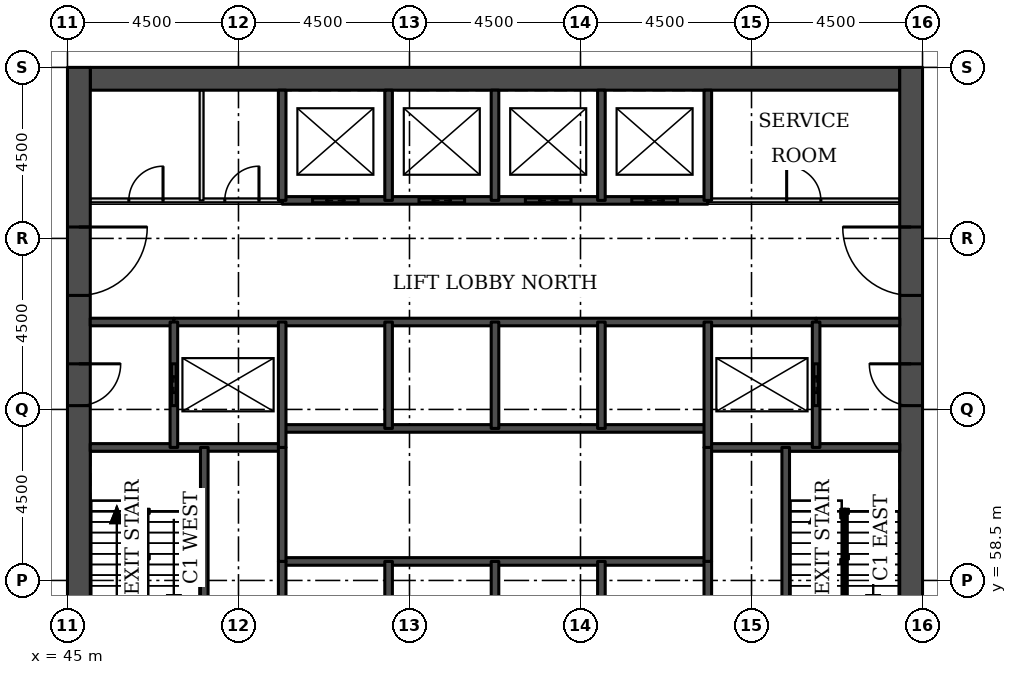
"""IFC4 building model, lengths in metres.
Left out: names, types, materials, properties, quantities, classifications, styles, units other than length and angle.
Written with IfcOpenShell. Run it as: python <this file> out.ifc"""

import sys

from ifc_helpers import new_model, si_unit, direction, frame, frame_2d, origin, place, context, subcontext, project, spatial, rectangle, extrude, element, fill, save


model = new_model("IFC4")
c1 = context("Model", 3, precision=1e-05, world=origin(), true_north=direction((0.0, 1.0)))
c2 = subcontext(c1, "Body", "Model", "MODEL_VIEW")
j1 = project(units=[si_unit("LENGTHUNIT", "METRE"), si_unit("PLANEANGLEUNIT", "RADIAN")], contexts=[c1])
p1 = place(None, origin())
s1 = spatial("IfcSite", under=j1, at=p1, CompositionType="ELEMENT")
p2 = place(p1, origin())
s2 = spatial("IfcBuilding", under=s1, at=p2, CompositionType="ELEMENT")
p3 = place(p2, frame((0.0, 0.0, 13.5)))
s3 = spatial("IfcBuildingStorey", under=s2, at=p3, CompositionType="ELEMENT", Elevation=13.5)
p4 = place(p3, frame((45.6, 71.7, 0.0), z_axis=(0.0, 0.0, 1.0), x_axis=(1.0, 0.0, 0.0)))
e1 = element("IfcWall", 1, at=p4, inside=s3, PredefinedType="SHEAR", context=c2, shape_type="SweptSolid", body=[
    extrude(rectangle(XDim=21.3, YDim=0.6, at=frame_2d((10.65, 0.0))), origin(), (0.0, 0.0, 1.0), 5.0),
])
p5 = place(p3, frame((45.3, 49.5, 0.0), z_axis=(0.0, 0.0, 1.0), x_axis=(0.0, 1.0, 0.0)))
e2 = element("IfcWall", 2, at=p5, inside=s3, PredefinedType="SHEAR", context=c2, shape_type="SweptSolid", body=[
    extrude(rectangle(XDim=22.5, YDim=0.6, at=frame_2d((11.25, 0.0))), origin(), (0.0, 0.0, 1.0), 5.0),
])
p6 = place(p5, frame((4.2, 0.0, 0.0)))
e3 = element("IfcOpeningElement", 3, at=p6, cuts=e2, PredefinedType="OPENING", context=c2, shape_type="SweptSolid", body=[
    extrude(rectangle(XDim=1.8, YDim=2.1, at=frame_2d((0.9, 1.05))), frame((0.0, 0.31, 0.0), z_axis=(0.0, -1.0, 0.0), x_axis=(1.0, 0.0, 0.0)), (0.0, 0.0, 1.0), 0.62),
])
p7 = place(p5, frame((6.9, 0.0, 0.0)))
e4 = element("IfcOpeningElement", 4, at=p7, cuts=e2, PredefinedType="OPENING", context=c2, shape_type="SweptSolid", body=[
    extrude(rectangle(XDim=1.1, YDim=2.1, at=frame_2d((0.55, 1.05))), frame((0.0, 0.31, 0.0), z_axis=(0.0, -1.0, 0.0), x_axis=(1.0, 0.0, 0.0)), (0.0, 0.0, 1.0), 0.62),
])
p8 = place(p5, frame((13.6, 0.0, 0.0)))
e5 = element("IfcOpeningElement", 5, at=p8, cuts=e2, PredefinedType="OPENING", context=c2, shape_type="SweptSolid", body=[
    extrude(rectangle(XDim=1.1, YDim=2.1, at=frame_2d((0.55, 1.05))), frame((0.0, 0.31, 0.0), z_axis=(0.0, -1.0, 0.0), x_axis=(1.0, 0.0, 0.0)), (0.0, 0.0, 1.0), 0.62),
])
p9 = place(p5, frame((16.5, 0.0, 0.0)))
e6 = element("IfcOpeningElement", 6, at=p9, cuts=e2, PredefinedType="OPENING", context=c2, shape_type="SweptSolid", body=[
    extrude(rectangle(XDim=1.8, YDim=2.1, at=frame_2d((0.9, 1.05))), frame((0.0, 0.31, 0.0), z_axis=(0.0, -1.0, 0.0), x_axis=(1.0, 0.0, 0.0)), (0.0, 0.0, 1.0), 0.62),
])
p10 = place(p3, frame((67.2, 49.5, 0.0), z_axis=(0.0, 0.0, 1.0), x_axis=(0.0, 1.0, 0.0)))
e7 = element("IfcWall", 7, at=p10, inside=s3, PredefinedType="SHEAR", context=c2, shape_type="SweptSolid", body=[
    extrude(rectangle(XDim=22.5, YDim=0.6, at=frame_2d((11.25, 0.0))), origin(), (0.0, 0.0, 1.0), 5.0),
])
p11 = place(p10, frame((4.2, 0.0, 0.0)))
e8 = element("IfcOpeningElement", 8, at=p11, cuts=e7, PredefinedType="OPENING", context=c2, shape_type="SweptSolid", body=[
    extrude(rectangle(XDim=1.8, YDim=2.1, at=frame_2d((0.9, 1.05))), frame((0.0, 0.31, 0.0), z_axis=(0.0, -1.0, 0.0), x_axis=(1.0, 0.0, 0.0)), (0.0, 0.0, 1.0), 0.62),
])
p12 = place(p10, frame((6.9, 0.0, 0.0)))
e9 = element("IfcOpeningElement", 9, at=p12, cuts=e7, PredefinedType="OPENING", context=c2, shape_type="SweptSolid", body=[
    extrude(rectangle(XDim=1.1, YDim=2.1, at=frame_2d((0.55, 1.05))), frame((0.0, 0.31, 0.0), z_axis=(0.0, -1.0, 0.0), x_axis=(1.0, 0.0, 0.0)), (0.0, 0.0, 1.0), 0.62),
])
p13 = place(p10, frame((13.6, 0.0, 0.0)))
e10 = element("IfcOpeningElement", 10, at=p13, cuts=e7, PredefinedType="OPENING", context=c2, shape_type="SweptSolid", body=[
    extrude(rectangle(XDim=1.1, YDim=2.1, at=frame_2d((0.55, 1.05))), frame((0.0, 0.31, 0.0), z_axis=(0.0, -1.0, 0.0), x_axis=(1.0, 0.0, 0.0)), (0.0, 0.0, 1.0), 0.62),
])
p14 = place(p10, frame((16.5, 0.0, 0.0)))
e11 = element("IfcOpeningElement", 11, at=p14, cuts=e7, PredefinedType="OPENING", context=c2, shape_type="SweptSolid", body=[
    extrude(rectangle(XDim=1.8, YDim=2.1, at=frame_2d((0.9, 1.05))), frame((0.0, 0.31, 0.0), z_axis=(0.0, -1.0, 0.0), x_axis=(1.0, 0.0, 0.0)), (0.0, 0.0, 1.0), 0.62),
])
p15 = place(p3, frame((50.65, 59.0, 0.0), z_axis=(0.0, 0.0, 1.0), x_axis=(1.0, 0.0, 0.0)))
e12 = element("IfcWall", 12, at=p15, inside=s3, PredefinedType="SOLIDWALL", context=c2, shape_type="SweptSolid", body=[
    extrude(rectangle(XDim=11.2, YDim=0.2, at=frame_2d((5.6, 0.0))), origin(), (0.0, 0.0, 1.0), 5.0),
])
for number, where, z_axis, x_axis in (
    (13, (45.6, 62.0, 0.0), (0.0, 0.0, 1.0), (1.0, 0.0, 0.0)),
    (14, (61.85, 62.0, 0.0), (0.0, 0.0, 1.0), (1.0, 0.0, 0.0)),
):
    element("IfcWall", number, at=place(p3, frame(where, z_axis=z_axis, x_axis=x_axis)), inside=s3, PredefinedType="SOLIDWALL", context=c2, shape_type="SweptSolid", body=[
        extrude(rectangle(XDim=5.05, YDim=0.2, at=frame_2d((2.525, 0.0))), origin(), (0.0, 0.0, 1.0), 4.78),
    ])
p16 = place(p3, frame((50.65, 62.5, 0.0), z_axis=(0.0, 0.0, 1.0), x_axis=(1.0, 0.0, 0.0)))
e15 = element("IfcWall", 15, at=p16, inside=s3, PredefinedType="SOLIDWALL", context=c2, shape_type="SweptSolid", body=[
    extrude(rectangle(XDim=11.2, YDim=0.2, at=frame_2d((5.6, 0.0))), origin(), (0.0, 0.0, 1.0), 5.0),
])
for number, where, z_axis, x_axis in (
    (16, (45.6, 65.3, 0.0), (0.0, 0.0, 1.0), (1.0, 0.0, 0.0)),
    (17, (64.7, 65.3, 0.0), (0.0, 0.0, 1.0), (1.0, 0.0, 0.0)),
):
    element("IfcWall", number, at=place(p3, frame(where, z_axis=z_axis, x_axis=x_axis)), inside=s3, PredefinedType="SOLIDWALL", context=c2, shape_type="SweptSolid", body=[
        extrude(rectangle(XDim=2.2, YDim=0.2, at=frame_2d((1.1, 0.0))), origin(), (0.0, 0.0, 1.0), 4.78),
    ])
p17 = place(p3, frame((47.8, 65.3, 0.0), z_axis=(0.0, 0.0, 1.0), x_axis=(1.0, 0.0, 0.0)))
e18 = element("IfcWall", 18, at=p17, inside=s3, PredefinedType="SOLIDWALL", context=c2, shape_type="SweptSolid", body=[
    extrude(rectangle(XDim=16.9, YDim=0.2, at=frame_2d((8.45, 0.0))), origin(), (0.0, 0.0, 1.0), 4.78),
])
p18 = place(p3, frame((45.6, 68.5, 0.0), z_axis=(0.0, 0.0, 1.0), x_axis=(1.0, 0.0, 0.0)))
e19 = element("IfcWall", 19, at=p18, inside=s3, PredefinedType="PARTITIONING", context=c2, shape_type="SweptSolid", body=[
    extrude(rectangle(XDim=5.05, YDim=0.1, at=frame_2d((2.525, 0.0))), origin(), (0.0, 0.0, 1.0), 4.78),
])
p19 = place(p18, frame((1.014, 0.0, 0.0)))
e20 = element("IfcOpeningElement", 20, at=p19, cuts=e19, PredefinedType="OPENING", context=c2, shape_type="SweptSolid", body=[
    extrude(rectangle(XDim=0.9, YDim=2.1, at=frame_2d((0.45, 1.05))), frame((0.0, 0.06, 0.0), z_axis=(0.0, -1.0, 0.0), x_axis=(1.0, 0.0, 0.0)), (0.0, 0.0, 1.0), 0.12),
])
p20 = place(p18, frame((3.54, 0.0, 0.0)))
e21 = element("IfcOpeningElement", 21, at=p20, cuts=e19, PredefinedType="OPENING", context=c2, shape_type="SweptSolid", body=[
    extrude(rectangle(XDim=0.9, YDim=2.1, at=frame_2d((0.45, 1.05))), frame((0.0, 0.06, 0.0), z_axis=(0.0, -1.0, 0.0), x_axis=(1.0, 0.0, 0.0)), (0.0, 0.0, 1.0), 0.12),
])
p21 = place(p3, frame((61.85, 68.5, 0.0), z_axis=(0.0, 0.0, 1.0), x_axis=(1.0, 0.0, 0.0)))
e22 = element("IfcWall", 22, at=p21, inside=s3, PredefinedType="PARTITIONING", context=c2, shape_type="SweptSolid", body=[
    extrude(rectangle(XDim=5.05, YDim=0.1, at=frame_2d((2.525, 0.0))), origin(), (0.0, 0.0, 1.0), 4.78),
])
p22 = place(p21, frame((2.075, 0.0, 0.0)))
e23 = element("IfcOpeningElement", 23, at=p22, cuts=e22, PredefinedType="OPENING", context=c2, shape_type="SweptSolid", body=[
    extrude(rectangle(XDim=0.9, YDim=2.1, at=frame_2d((0.45, 1.05))), frame((0.0, 0.06, 0.0), z_axis=(0.0, -1.0, 0.0), x_axis=(1.0, 0.0, 0.0)), (0.0, 0.0, 1.0), 0.12),
])
p23 = place(p3, frame((50.65, 68.5, 0.0), z_axis=(0.0, 0.0, 1.0), x_axis=(1.0, 0.0, 0.0)))
e24 = element("IfcWall", 24, at=p23, inside=s3, PredefinedType="SOLIDWALL", context=c2, shape_type="SweptSolid", body=[
    extrude(rectangle(XDim=11.2, YDim=0.2, at=frame_2d((5.6, 0.0))), origin(), (0.0, 0.0, 1.0), 4.78),
])
p24 = place(p23, frame((0.8, 0.0, 0.0)))
e25 = element("IfcOpeningElement", 25, at=p24, cuts=e24, PredefinedType="OPENING", context=c2, shape_type="SweptSolid", body=[
    extrude(rectangle(XDim=1.2, YDim=2.1, at=frame_2d((0.6, 1.05))), frame((0.0, 0.11, 0.0), z_axis=(0.0, -1.0, 0.0), x_axis=(1.0, 0.0, 0.0)), (0.0, 0.0, 1.0), 0.22),
])
p25 = place(p23, frame((3.6, 0.0, 0.0)))
e26 = element("IfcOpeningElement", 26, at=p25, cuts=e24, PredefinedType="OPENING", context=c2, shape_type="SweptSolid", body=[
    extrude(rectangle(XDim=1.2, YDim=2.1, at=frame_2d((0.6, 1.05))), frame((0.0, 0.11, 0.0), z_axis=(0.0, -1.0, 0.0), x_axis=(1.0, 0.0, 0.0)), (0.0, 0.0, 1.0), 0.22),
])
p26 = place(p23, frame((6.4, 0.0, 0.0)))
e27 = element("IfcOpeningElement", 27, at=p26, cuts=e24, PredefinedType="OPENING", context=c2, shape_type="SweptSolid", body=[
    extrude(rectangle(XDim=1.2, YDim=2.1, at=frame_2d((0.6, 1.05))), frame((0.0, 0.11, 0.0), z_axis=(0.0, -1.0, 0.0), x_axis=(1.0, 0.0, 0.0)), (0.0, 0.0, 1.0), 0.22),
])
p27 = place(p23, frame((9.2, 0.0, 0.0)))
e28 = element("IfcOpeningElement", 28, at=p27, cuts=e24, PredefinedType="OPENING", context=c2, shape_type="SweptSolid", body=[
    extrude(rectangle(XDim=1.2, YDim=2.1, at=frame_2d((0.6, 1.05))), frame((0.0, 0.11, 0.0), z_axis=(0.0, -1.0, 0.0), x_axis=(1.0, 0.0, 0.0)), (0.0, 0.0, 1.0), 0.22),
])
p28 = place(p3, frame((47.8, 62.0, 0.0), z_axis=(0.0, 0.0, 1.0), x_axis=(0.0, 1.0, 0.0)))
e29 = element("IfcWall", 29, at=p28, inside=s3, PredefinedType="SOLIDWALL", context=c2, shape_type="SweptSolid", body=[
    extrude(rectangle(XDim=3.3, YDim=0.2, at=frame_2d((1.65, 0.0))), origin(), (0.0, 0.0, 1.0), 4.78),
])
p29 = place(p28, frame((1.1, 0.0, 0.0)))
e30 = element("IfcOpeningElement", 30, at=p29, cuts=e29, PredefinedType="OPENING", context=c2, shape_type="SweptSolid", body=[
    extrude(rectangle(XDim=1.1, YDim=2.1, at=frame_2d((0.55, 1.05))), frame((0.0, 0.11, 0.0), z_axis=(0.0, -1.0, 0.0), x_axis=(1.0, 0.0, 0.0)), (0.0, 0.0, 1.0), 0.22),
])
p30 = place(p3, frame((48.529, 68.5, 0.0), z_axis=(0.0, 0.0, 1.0), x_axis=(0.0, 1.0, 0.0)))
e31 = element("IfcWall", 31, at=p30, inside=s3, PredefinedType="PARTITIONING", context=c2, shape_type="SweptSolid", body=[
    extrude(rectangle(XDim=2.9, YDim=0.1, at=frame_2d((1.45, 0.0))), origin(), (0.0, 0.0, 1.0), 4.78),
])
p31 = place(p3, frame((48.6, 56.2, 0.0), z_axis=(0.0, 0.0, 1.0), x_axis=(0.0, 1.0, 0.0)))
e32 = element("IfcWall", 32, at=p31, inside=s3, PredefinedType="SOLIDWALL", context=c2, shape_type="SweptSolid", body=[
    extrude(rectangle(XDim=5.8, YDim=0.2, at=frame_2d((2.9, 0.0))), origin(), (0.0, 0.0, 1.0), 4.78),
])
p32 = place(p3, frame((50.65, 59.0, 0.0), z_axis=(0.0, 0.0, 1.0), x_axis=(0.0, 1.0, 0.0)))
e33 = element("IfcWall", 33, at=p32, inside=s3, PredefinedType="SOLIDWALL", context=c2, shape_type="SweptSolid", body=[
    extrude(rectangle(XDim=3.0, YDim=0.2, at=frame_2d((1.5, 0.0))), origin(), (0.0, 0.0, 1.0), 5.0),
])
p33 = place(p3, frame((50.65, 56.2, 0.0), z_axis=(0.0, 0.0, 1.0), x_axis=(0.0, 1.0, 0.0)))
e34 = element("IfcWall", 34, at=p33, inside=s3, PredefinedType="SOLIDWALL", context=c2, shape_type="SweptSolid", body=[
    extrude(rectangle(XDim=2.8, YDim=0.2, at=frame_2d((1.4, 0.0))), origin(), (0.0, 0.0, 1.0), 4.78),
])
p34 = place(p3, frame((50.65, 62.0, 0.0), z_axis=(0.0, 0.0, 1.0), x_axis=(0.0, 1.0, 0.0)))
e35 = element("IfcWall", 35, at=p34, inside=s3, PredefinedType="SOLIDWALL", context=c2, shape_type="SweptSolid", body=[
    extrude(rectangle(XDim=3.3, YDim=0.2, at=frame_2d((1.65, 0.0))), origin(), (0.0, 0.0, 1.0), 4.78),
])
p35 = place(p3, frame((50.65, 68.5, 0.0), z_axis=(0.0, 0.0, 1.0), x_axis=(0.0, 1.0, 0.0)))
e36 = element("IfcWall", 36, at=p35, inside=s3, PredefinedType="SOLIDWALL", context=c2, shape_type="SweptSolid", body=[
    extrude(rectangle(XDim=2.9, YDim=0.2, at=frame_2d((1.45, 0.0))), origin(), (0.0, 0.0, 1.0), 4.78),
])
for number, where, z_axis, x_axis in (
    (37, (53.45, 56.2, 0.0), (0.0, 0.0, 1.0), (0.0, 1.0, 0.0)),
    (38, (53.45, 62.5, 0.0), (0.0, 0.0, 1.0), (0.0, 1.0, 0.0)),
):
    element("IfcWall", number, at=place(p3, frame(where, z_axis=z_axis, x_axis=x_axis)), inside=s3, PredefinedType="SOLIDWALL", context=c2, shape_type="SweptSolid", body=[
        extrude(rectangle(XDim=2.8, YDim=0.2, at=frame_2d((1.4, 0.0))), origin(), (0.0, 0.0, 1.0), 4.78),
    ])
p36 = place(p3, frame((53.45, 68.5, 0.0), z_axis=(0.0, 0.0, 1.0), x_axis=(0.0, 1.0, 0.0)))
e39 = element("IfcWall", 39, at=p36, inside=s3, PredefinedType="SOLIDWALL", context=c2, shape_type="SweptSolid", body=[
    extrude(rectangle(XDim=2.9, YDim=0.2, at=frame_2d((1.45, 0.0))), origin(), (0.0, 0.0, 1.0), 4.78),
])
for number, where, z_axis, x_axis in (
    (40, (56.25, 56.2, 0.0), (0.0, 0.0, 1.0), (0.0, 1.0, 0.0)),
    (41, (56.25, 62.5, 0.0), (0.0, 0.0, 1.0), (0.0, 1.0, 0.0)),
):
    element("IfcWall", number, at=place(p3, frame(where, z_axis=z_axis, x_axis=x_axis)), inside=s3, PredefinedType="SOLIDWALL", context=c2, shape_type="SweptSolid", body=[
        extrude(rectangle(XDim=2.8, YDim=0.2, at=frame_2d((1.4, 0.0))), origin(), (0.0, 0.0, 1.0), 4.78),
    ])
p37 = place(p3, frame((56.25, 68.5, 0.0), z_axis=(0.0, 0.0, 1.0), x_axis=(0.0, 1.0, 0.0)))
e42 = element("IfcWall", 42, at=p37, inside=s3, PredefinedType="SOLIDWALL", context=c2, shape_type="SweptSolid", body=[
    extrude(rectangle(XDim=2.9, YDim=0.2, at=frame_2d((1.45, 0.0))), origin(), (0.0, 0.0, 1.0), 4.78),
])
for number, where, z_axis, x_axis in (
    (43, (59.05, 56.2, 0.0), (0.0, 0.0, 1.0), (0.0, 1.0, 0.0)),
    (44, (59.05, 62.5, 0.0), (0.0, 0.0, 1.0), (0.0, 1.0, 0.0)),
):
    element("IfcWall", number, at=place(p3, frame(where, z_axis=z_axis, x_axis=x_axis)), inside=s3, PredefinedType="SOLIDWALL", context=c2, shape_type="SweptSolid", body=[
        extrude(rectangle(XDim=2.8, YDim=0.2, at=frame_2d((1.4, 0.0))), origin(), (0.0, 0.0, 1.0), 4.78),
    ])
p38 = place(p3, frame((59.05, 68.5, 0.0), z_axis=(0.0, 0.0, 1.0), x_axis=(0.0, 1.0, 0.0)))
e45 = element("IfcWall", 45, at=p38, inside=s3, PredefinedType="SOLIDWALL", context=c2, shape_type="SweptSolid", body=[
    extrude(rectangle(XDim=2.9, YDim=0.2, at=frame_2d((1.45, 0.0))), origin(), (0.0, 0.0, 1.0), 4.78),
])
p39 = place(p3, frame((61.85, 59.0, 0.0), z_axis=(0.0, 0.0, 1.0), x_axis=(0.0, 1.0, 0.0)))
e46 = element("IfcWall", 46, at=p39, inside=s3, PredefinedType="SOLIDWALL", context=c2, shape_type="SweptSolid", body=[
    extrude(rectangle(XDim=3.0, YDim=0.2, at=frame_2d((1.5, 0.0))), origin(), (0.0, 0.0, 1.0), 5.0),
])
p40 = place(p3, frame((61.85, 56.2, 0.0), z_axis=(0.0, 0.0, 1.0), x_axis=(0.0, 1.0, 0.0)))
e47 = element("IfcWall", 47, at=p40, inside=s3, PredefinedType="SOLIDWALL", context=c2, shape_type="SweptSolid", body=[
    extrude(rectangle(XDim=2.8, YDim=0.2, at=frame_2d((1.4, 0.0))), origin(), (0.0, 0.0, 1.0), 4.78),
])
p41 = place(p3, frame((61.85, 62.0, 0.0), z_axis=(0.0, 0.0, 1.0), x_axis=(0.0, 1.0, 0.0)))
e48 = element("IfcWall", 48, at=p41, inside=s3, PredefinedType="SOLIDWALL", context=c2, shape_type="SweptSolid", body=[
    extrude(rectangle(XDim=3.3, YDim=0.2, at=frame_2d((1.65, 0.0))), origin(), (0.0, 0.0, 1.0), 4.78),
])
p42 = place(p3, frame((61.85, 68.5, 0.0), z_axis=(0.0, 0.0, 1.0), x_axis=(0.0, 1.0, 0.0)))
e49 = element("IfcWall", 49, at=p42, inside=s3, PredefinedType="SOLIDWALL", context=c2, shape_type="SweptSolid", body=[
    extrude(rectangle(XDim=2.9, YDim=0.2, at=frame_2d((1.45, 0.0))), origin(), (0.0, 0.0, 1.0), 4.78),
])
p43 = place(p3, frame((63.9, 56.2, 0.0), z_axis=(0.0, 0.0, 1.0), x_axis=(0.0, 1.0, 0.0)))
e50 = element("IfcWall", 50, at=p43, inside=s3, PredefinedType="SOLIDWALL", context=c2, shape_type="SweptSolid", body=[
    extrude(rectangle(XDim=5.8, YDim=0.2, at=frame_2d((2.9, 0.0))), origin(), (0.0, 0.0, 1.0), 4.78),
])
p44 = place(p3, frame((64.7, 62.0, 0.0), z_axis=(0.0, 0.0, 1.0), x_axis=(0.0, 1.0, 0.0)))
e51 = element("IfcWall", 51, at=p44, inside=s3, PredefinedType="SOLIDWALL", context=c2, shape_type="SweptSolid", body=[
    extrude(rectangle(XDim=3.3, YDim=0.2, at=frame_2d((1.65, 0.0))), origin(), (0.0, 0.0, 1.0), 4.78),
])
p45 = place(p44, frame((1.1, 0.0, 0.0)))
e52 = element("IfcOpeningElement", 52, at=p45, cuts=e51, PredefinedType="OPENING", context=c2, shape_type="SweptSolid", body=[
    extrude(rectangle(XDim=1.1, YDim=2.1, at=frame_2d((0.55, 1.05))), frame((0.0, 0.11, 0.0), z_axis=(0.0, -1.0, 0.0), x_axis=(1.0, 0.0, 0.0)), (0.0, 0.0, 1.0), 0.22),
])
p46 = place(p24, origin())
e53 = element("IfcDoor", 53, at=p46, inside=s3, OperationType="DOUBLE_DOOR_SLIDING", PredefinedType="DOOR", context=c2, shape_type="SweptSolid", body=[
    extrude(rectangle(XDim=1.2, YDim=2.1, at=frame_2d((0.6, 1.05))), frame((0.0, 0.025, 0.0), z_axis=(0.0, -1.0, 0.0), x_axis=(1.0, 0.0, 0.0)), (0.0, 0.0, 1.0), 0.05),
])
fill(e25, e53)
p47 = place(p25, origin())
e54 = element("IfcDoor", 54, at=p47, inside=s3, OperationType="DOUBLE_DOOR_SLIDING", PredefinedType="DOOR", context=c2, shape_type="SweptSolid", body=[
    extrude(rectangle(XDim=1.2, YDim=2.1, at=frame_2d((0.6, 1.05))), frame((0.0, 0.025, 0.0), z_axis=(0.0, -1.0, 0.0), x_axis=(1.0, 0.0, 0.0)), (0.0, 0.0, 1.0), 0.05),
])
fill(e26, e54)
p48 = place(p26, origin())
e55 = element("IfcDoor", 55, at=p48, inside=s3, OperationType="DOUBLE_DOOR_SLIDING", PredefinedType="DOOR", context=c2, shape_type="SweptSolid", body=[
    extrude(rectangle(XDim=1.2, YDim=2.1, at=frame_2d((0.6, 1.05))), frame((0.0, 0.025, 0.0), z_axis=(0.0, -1.0, 0.0), x_axis=(1.0, 0.0, 0.0)), (0.0, 0.0, 1.0), 0.05),
])
fill(e27, e55)
p49 = place(p27, origin())
e56 = element("IfcDoor", 56, at=p49, inside=s3, OperationType="DOUBLE_DOOR_SLIDING", PredefinedType="DOOR", context=c2, shape_type="SweptSolid", body=[
    extrude(rectangle(XDim=1.2, YDim=2.1, at=frame_2d((0.6, 1.05))), frame((0.0, 0.025, 0.0), z_axis=(0.0, -1.0, 0.0), x_axis=(1.0, 0.0, 0.0)), (0.0, 0.0, 1.0), 0.05),
])
fill(e28, e56)
p50 = place(p29, origin())
e57 = element("IfcDoor", 57, at=p50, inside=s3, OperationType="DOUBLE_DOOR_SLIDING", PredefinedType="DOOR", context=c2, shape_type="SweptSolid", body=[
    extrude(rectangle(XDim=1.1, YDim=2.1, at=frame_2d((0.55, 1.05))), frame((0.0, 0.025, 0.0), z_axis=(0.0, -1.0, 0.0), x_axis=(1.0, 0.0, 0.0)), (0.0, 0.0, 1.0), 0.05),
])
fill(e30, e57)
p51 = place(p45, origin())
e58 = element("IfcDoor", 58, at=p51, inside=s3, OperationType="DOUBLE_DOOR_SLIDING", PredefinedType="DOOR", context=c2, shape_type="SweptSolid", body=[
    extrude(rectangle(XDim=1.1, YDim=2.1, at=frame_2d((0.55, 1.05))), frame((0.0, 0.025, 0.0), z_axis=(0.0, -1.0, 0.0), x_axis=(1.0, 0.0, 0.0)), (0.0, 0.0, 1.0), 0.05),
])
fill(e52, e58)
p52 = place(p8, frame((1.1, 0.0, 0.0), z_axis=(0.0, 0.0, 1.0), x_axis=(-1.0, 0.0, 0.0)))
e59 = element("IfcDoor", 59, at=p52, inside=s3, OperationType="SINGLE_SWING_LEFT", PredefinedType="DOOR", context=c2, shape_type="SweptSolid", body=[
    extrude(rectangle(XDim=1.1, YDim=2.1, at=frame_2d((0.55, 1.05))), frame((0.0, 0.025, 0.0), z_axis=(0.0, -1.0, 0.0), x_axis=(1.0, 0.0, 0.0)), (0.0, 0.0, 1.0), 0.05),
])
fill(e5, e59)
p53 = place(p9, frame((1.8, 0.0, 0.0), z_axis=(0.0, 0.0, 1.0), x_axis=(-1.0, 0.0, 0.0)))
e60 = element("IfcDoor", 60, at=p53, inside=s3, OperationType="SINGLE_SWING_LEFT", PredefinedType="DOOR", context=c2, shape_type="SweptSolid", body=[
    extrude(rectangle(XDim=1.8, YDim=2.1, at=frame_2d((0.9, 1.05))), frame((0.0, 0.025, 0.0), z_axis=(0.0, -1.0, 0.0), x_axis=(1.0, 0.0, 0.0)), (0.0, 0.0, 1.0), 0.05),
])
fill(e6, e60)
p54 = place(p13, origin())
e61 = element("IfcDoor", 61, at=p54, inside=s3, OperationType="SINGLE_SWING_RIGHT", PredefinedType="DOOR", context=c2, shape_type="SweptSolid", body=[
    extrude(rectangle(XDim=1.1, YDim=2.1, at=frame_2d((0.55, 1.05))), frame((0.0, 0.025, 0.0), z_axis=(0.0, -1.0, 0.0), x_axis=(1.0, 0.0, 0.0)), (0.0, 0.0, 1.0), 0.05),
])
fill(e10, e61)
p55 = place(p14, origin())
e62 = element("IfcDoor", 62, at=p55, inside=s3, OperationType="SINGLE_SWING_RIGHT", PredefinedType="DOOR", context=c2, shape_type="SweptSolid", body=[
    extrude(rectangle(XDim=1.8, YDim=2.1, at=frame_2d((0.9, 1.05))), frame((0.0, 0.025, 0.0), z_axis=(0.0, -1.0, 0.0), x_axis=(1.0, 0.0, 0.0)), (0.0, 0.0, 1.0), 0.05),
])
fill(e11, e62)
p56 = place(p22, origin())
e63 = element("IfcDoor", 63, at=p56, inside=s3, OperationType="SINGLE_SWING_LEFT", PredefinedType="DOOR", context=c2, shape_type="SweptSolid", body=[
    extrude(rectangle(XDim=0.9, YDim=2.1, at=frame_2d((0.45, 1.05))), frame((0.0, 0.025, 0.0), z_axis=(0.0, -1.0, 0.0), x_axis=(1.0, 0.0, 0.0)), (0.0, 0.0, 1.0), 0.05),
])
fill(e23, e63)
p57 = place(p19, origin())
e64 = element("IfcDoor", 64, at=p57, inside=s3, OperationType="SINGLE_SWING_RIGHT", PredefinedType="DOOR", context=c2, shape_type="SweptSolid", body=[
    extrude(rectangle(XDim=0.9, YDim=2.1, at=frame_2d((0.45, 1.05))), frame((0.0, 0.025, 0.0), z_axis=(0.0, -1.0, 0.0), x_axis=(1.0, 0.0, 0.0)), (0.0, 0.0, 1.0), 0.05),
])
fill(e20, e64)
p58 = place(p20, origin())
e65 = element("IfcDoor", 65, at=p58, inside=s3, OperationType="SINGLE_SWING_RIGHT", PredefinedType="DOOR", context=c2, shape_type="SweptSolid", body=[
    extrude(rectangle(XDim=0.9, YDim=2.1, at=frame_2d((0.45, 1.05))), frame((0.0, 0.025, 0.0), z_axis=(0.0, -1.0, 0.0), x_axis=(1.0, 0.0, 0.0)), (0.0, 0.0, 1.0), 0.05),
])
fill(e21, e65)
save(model, sys.argv[1])
